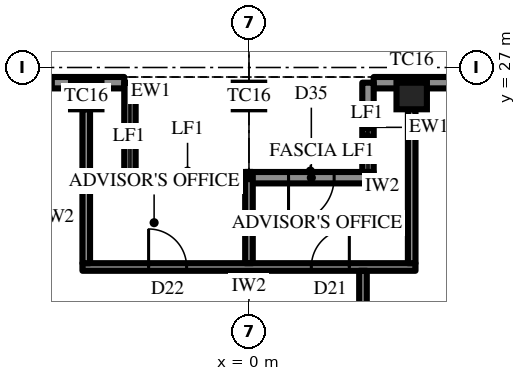
"""IFC4 building model, lengths in metres.
Left out: names, types, materials, properties, quantities, classifications, styles, units other than length and angle.
Written with IfcOpenShell. Run it as: python <this file> out.ifc"""

import sys

from ifc_helpers import new_model, si_unit, direction, frame, frame_2d, origin, origin_2d, place, context, subcontext, project, spatial, rectangle, extrude, element, fill, save


model = new_model("IFC4")
c1 = context("Model", 3, precision=1e-05, world=origin(), true_north=direction((0.0, 1.0)))
c2 = subcontext(c1, "Body", "Model", "MODEL_VIEW")
j1 = project(units=[si_unit("LENGTHUNIT", "METRE"), si_unit("PLANEANGLEUNIT", "RADIAN")], contexts=[c1])
p1 = place(None, origin())
s1 = spatial("IfcSite", under=j1, at=p1, CompositionType="ELEMENT")
p2 = place(p1, origin())
s2 = spatial("IfcBuilding", under=s1, at=p2, CompositionType="ELEMENT")
p3 = place(p2, frame((0.0, 0.0, 374.5)))
s3 = spatial("IfcBuildingStorey", under=s2, at=p3, CompositionType="ELEMENT", Elevation=374.5)
for number, where, z_axis, x_axis in (
    (1, (4.282, 26.25, 0.0), (0.0, 0.0, 1.0), (-1.0, 0.0, 0.0)),
    (2, (0.0, 26.25, 0.0), (0.0, 0.0, 1.0), (-1.0, 0.0, 0.0)),
    (3, (-4.282, 26.25, 0.0), (0.0, 0.0, 1.0), (-1.0, 0.0, 0.0)),
):
    element("IfcColumn", number, at=place(p3, frame(where, z_axis=z_axis, x_axis=x_axis)), inside=s3, PredefinedType="COLUMN", context=c2, shape_type="SweptSolid", body=[
        extrude(rectangle(XDim=0.8, YDim=0.7, at=origin_2d()), origin(), (0.0, 0.0, 1.0), 4.2),
    ])
p4 = place(p3, frame((12.846, 26.6, 0.0), z_axis=(0.0, 0.0, 1.0), x_axis=(-1.0, 0.0, 0.0)))
e4 = element("IfcWall", 4, at=p4, inside=s3, PredefinedType="SOLIDWALL", context=c2, shape_type="SweptSolid", body=[
    extrude(rectangle(XDim=9.564, YDim=0.3, at=frame_2d((4.782, 0.0))), origin(), (0.0, 0.0, 1.0), 2.9),
])
p5 = place(p4, frame((0.866, 0.0, 0.6)))
e5 = element("IfcOpeningElement", 5, at=p5, cuts=e4, PredefinedType="OPENING", context=c2, shape_type="SweptSolid", body=[
    extrude(rectangle(XDim=2.55, YDim=2.05, at=frame_2d((1.275, 1.025))), frame((0.0, 0.16, 0.0), z_axis=(0.0, -1.0, 0.0), x_axis=(1.0, 0.0, 0.0)), (0.0, 0.0, 1.0), 0.32),
])
p6 = place(p4, frame((5.823, 0.0, 0.0)))
e6 = element("IfcOpeningElement", 6, at=p6, cuts=e4, PredefinedType="OPENING", context=c2, shape_type="SweptSolid", body=[
    extrude(rectangle(XDim=1.2, YDim=2.4, at=frame_2d((0.6, 1.2))), frame((0.0, 0.16, 0.0), z_axis=(0.0, -1.0, 0.0), x_axis=(1.0, 0.0, 0.0)), (0.0, 0.0, 1.0), 0.32),
])
p7 = place(p3, frame((-3.282, 26.6, 0.0), z_axis=(0.0, 0.0, 1.0), x_axis=(-1.0, 0.0, 0.0)))
e7 = element("IfcWall", 7, at=p7, inside=s3, PredefinedType="SOLIDWALL", context=c2, shape_type="SweptSolid", body=[
    extrude(rectangle(XDim=9.564, YDim=0.3, at=frame_2d((4.782, 0.0))), origin(), (0.0, 0.0, 1.0), 2.9),
])
p8 = place(p7, frame((1.866, 0.0, 0.6)))
e8 = element("IfcOpeningElement", 8, at=p8, cuts=e7, PredefinedType="OPENING", context=c2, shape_type="SweptSolid", body=[
    extrude(rectangle(XDim=2.55, YDim=2.05, at=frame_2d((1.275, 1.025))), frame((0.0, 0.16, 0.0), z_axis=(0.0, -1.0, 0.0), x_axis=(1.0, 0.0, 0.0)), (0.0, 0.0, 1.0), 0.32),
])
p9 = place(p7, frame((6.148, 0.0, 0.6)))
e9 = element("IfcOpeningElement", 9, at=p9, cuts=e7, PredefinedType="OPENING", context=c2, shape_type="SweptSolid", body=[
    extrude(rectangle(XDim=2.55, YDim=2.05, at=frame_2d((1.275, 1.025))), frame((0.0, 0.16, 0.0), z_axis=(0.0, -1.0, 0.0), x_axis=(1.0, 0.0, 0.0)), (0.0, 0.0, 1.0), 0.32),
])
for number, where, z_axis, x_axis in (
    (10, (3.132, 26.6, 0.0), (0.0, 0.0, 1.0), (0.0, -1.0, 0.0)),
    (11, (-3.132, 26.6, 0.0), (0.0, 0.0, 1.0), (0.0, -1.0, 0.0)),
):
    element("IfcWall", number, at=place(p3, frame(where, z_axis=z_axis, x_axis=x_axis)), inside=s3, PredefinedType="SOLIDWALL", context=c2, shape_type="SweptSolid", body=[
        extrude(rectangle(XDim=2.35, YDim=0.3, at=frame_2d((1.175, 0.0))), origin(), (0.0, 0.0, 1.0), 2.9),
    ])
p10 = place(p3, frame((3.282, 24.1, 0.0), z_axis=(0.0, 0.0, 1.0), x_axis=(-1.0, 0.0, 0.0)))
e12 = element("IfcWall", 12, at=p10, inside=s3, PredefinedType="SOLIDWALL", context=c2, shape_type="SweptSolid", body=[
    extrude(rectangle(XDim=6.564, YDim=0.3, at=frame_2d((3.282, 0.0))), origin(), (0.0, 0.0, 1.0), 2.9),
])
p11 = place(p10, frame((1.041, 0.0, 0.0)))
e13 = element("IfcOpeningElement", 13, at=p11, cuts=e12, PredefinedType="OPENING", context=c2, shape_type="SweptSolid", body=[
    extrude(rectangle(XDim=1.2, YDim=2.4, at=frame_2d((0.6, 1.2))), frame((0.0, 0.16, 0.0), z_axis=(0.0, -1.0, 0.0), x_axis=(1.0, 0.0, 0.0)), (0.0, 0.0, 1.0), 0.32),
])
p12 = place(p3, frame((4.382, 21.75, 0.0), z_axis=(0.0, 0.0, 1.0), x_axis=(-1.0, 0.0, 0.0)))
e14 = element("IfcWall", 14, at=p12, inside=s3, PredefinedType="PARTITIONING", context=c2, shape_type="SweptSolid", body=[
    extrude(rectangle(XDim=8.764, YDim=0.2, at=frame_2d((4.382, 0.0))), origin(), (0.0, 0.0, 1.0), 4.0),
])
p13 = place(p12, frame((1.741, 0.0, 0.0)))
e15 = element("IfcOpeningElement", 15, at=p13, cuts=e14, PredefinedType="OPENING", context=c2, shape_type="SweptSolid", body=[
    extrude(rectangle(XDim=1.0, YDim=2.2, at=frame_2d((0.5, 1.1))), frame((0.0, 0.11, 0.0), z_axis=(0.0, -1.0, 0.0), x_axis=(1.0, 0.0, 0.0)), (0.0, 0.0, 1.0), 0.22),
])
p14 = place(p12, frame((6.023, 0.0, 0.0)))
e16 = element("IfcOpeningElement", 16, at=p14, cuts=e14, PredefinedType="OPENING", context=c2, shape_type="SweptSolid", body=[
    extrude(rectangle(XDim=1.0, YDim=2.2, at=frame_2d((0.5, 1.1))), frame((0.0, 0.11, 0.0), z_axis=(0.0, -1.0, 0.0), x_axis=(1.0, 0.0, 0.0)), (0.0, 0.0, 1.0), 0.22),
])
p15 = place(p3, frame((4.282, 21.85, 0.0), z_axis=(0.0, 0.0, 1.0), x_axis=(0.0, 1.0, 0.0)))
e17 = element("IfcWall", 17, at=p15, inside=s3, PredefinedType="PARTITIONING", context=c2, shape_type="SweptSolid", body=[
    extrude(rectangle(XDim=4.05, YDim=0.2, at=frame_2d((2.025, 0.0))), origin(), (0.0, 0.0, 1.0), 2.992),
])
p16 = place(p3, frame((0.0, 21.85, 0.0), z_axis=(0.0, 0.0, 1.0), x_axis=(0.0, 1.0, 0.0)))
e18 = element("IfcWall", 18, at=p16, inside=s3, PredefinedType="PARTITIONING", context=c2, shape_type="SweptSolid", body=[
    extrude(rectangle(XDim=2.401, YDim=0.2, at=frame_2d((1.2, 0.0))), origin(), (0.0, 0.0, 1.0), 2.992),
])
p17 = place(p3, frame((-4.282, 21.85, 0.0), z_axis=(0.0, 0.0, 1.0), x_axis=(0.0, 1.0, 0.0)))
e19 = element("IfcWall", 19, at=p17, inside=s3, PredefinedType="PARTITIONING", context=c2, shape_type="SweptSolid", body=[
    extrude(rectangle(XDim=4.05, YDim=0.2, at=frame_2d((2.025, 0.0))), origin(), (0.0, 0.0, 1.0), 2.992),
])
p18 = place(p3, frame((3.0, 18.2, 0.0), z_axis=(0.0, 0.0, 1.0), x_axis=(0.0, 1.0, 0.0)))
e20 = element("IfcWall", 20, at=p18, inside=s3, PredefinedType="PARTITIONING", context=c2, shape_type="SweptSolid", body=[
    extrude(rectangle(XDim=3.45, YDim=0.2, at=frame_2d((1.725, 0.0))), origin(), (0.0, 0.0, 1.0), 4.0),
])
p19 = place(p8, origin())
e21 = element("IfcWindow", 21, at=p19, inside=s3, PartitioningType="SINGLE_PANEL", PredefinedType="WINDOW", context=c2, shape_type="SweptSolid", body=[
    extrude(rectangle(XDim=2.55, YDim=2.05, at=frame_2d((1.275, 1.025))), frame((0.0, 0.03, 0.0), z_axis=(0.0, -1.0, 0.0), x_axis=(1.0, 0.0, 0.0)), (0.0, 0.0, 1.0), 0.06),
])
fill(e8, e21)
p20 = place(p11, origin())
e22 = element("IfcDoor", 22, at=p20, inside=s3, OperationType="SINGLE_SWING_LEFT", PredefinedType="DOOR", context=c2, shape_type="SweptSolid", body=[
    extrude(rectangle(XDim=1.2, YDim=2.4, at=frame_2d((0.6, 1.2))), frame((0.0, 0.025, 0.0), z_axis=(0.0, -1.0, 0.0), x_axis=(1.0, 0.0, 0.0)), (0.0, 0.0, 1.0), 0.05),
])
fill(e13, e22)
p21 = place(p13, frame((1.0, 0.0, 0.0), z_axis=(0.0, 0.0, 1.0), x_axis=(-1.0, 0.0, 0.0)))
e23 = element("IfcDoor", 23, at=p21, inside=s3, OperationType="SINGLE_SWING_LEFT", PredefinedType="DOOR", context=c2, shape_type="SweptSolid", body=[
    extrude(rectangle(XDim=1.0, YDim=2.2, at=frame_2d((0.5, 1.1))), frame((0.0, 0.025, 0.0), z_axis=(0.0, -1.0, 0.0), x_axis=(1.0, 0.0, 0.0)), (0.0, 0.0, 1.0), 0.05),
])
fill(e15, e23)
p22 = place(p14, frame((1.0, 0.0, 0.0), z_axis=(0.0, 0.0, 1.0), x_axis=(-1.0, 0.0, 0.0)))
e24 = element("IfcDoor", 24, at=p22, inside=s3, OperationType="SINGLE_SWING_RIGHT", PredefinedType="DOOR", context=c2, shape_type="SweptSolid", body=[
    extrude(rectangle(XDim=1.0, YDim=2.2, at=frame_2d((0.5, 1.1))), frame((0.0, 0.025, 0.0), z_axis=(0.0, -1.0, 0.0), x_axis=(1.0, 0.0, 0.0)), (0.0, 0.0, 1.0), 0.05),
])
fill(e16, e24)
save(model, sys.argv[1])
